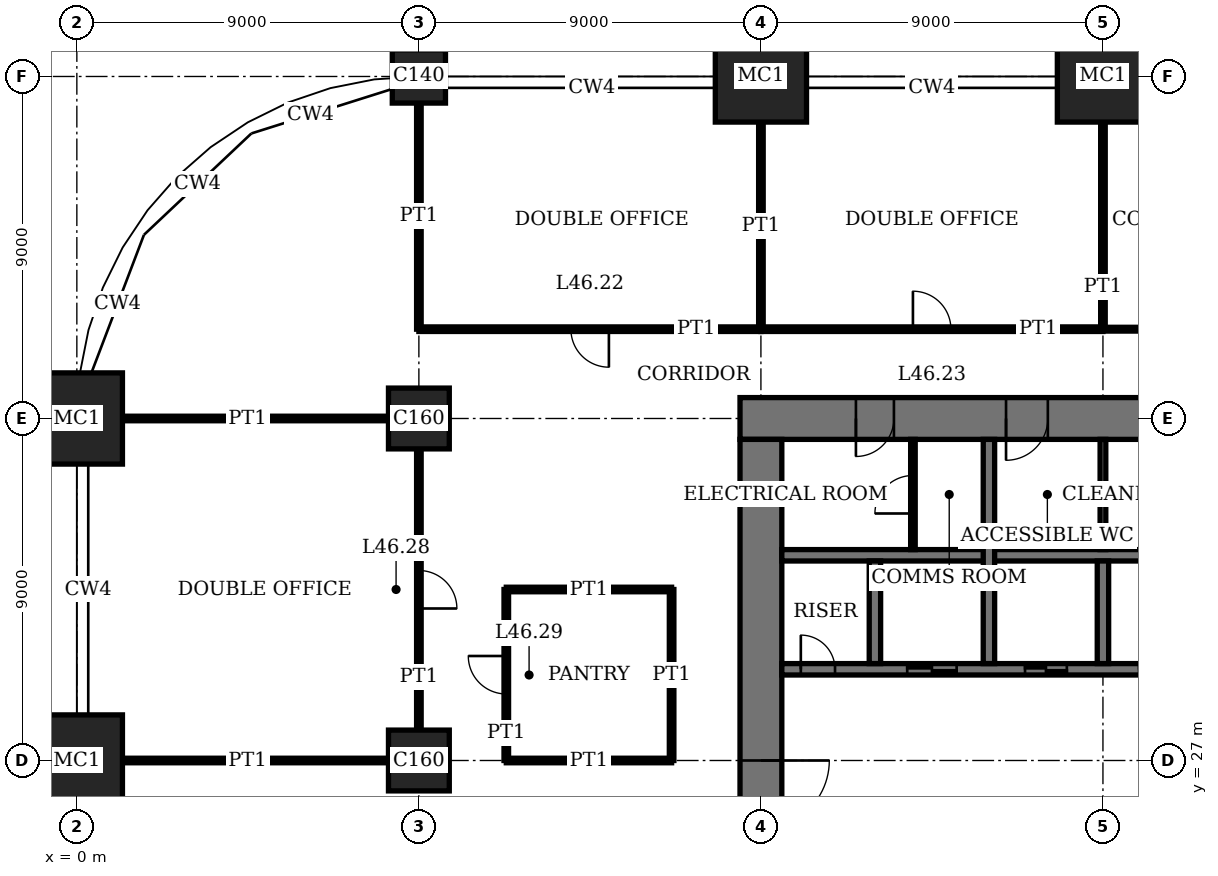
"""IFC4 building model, lengths in metres.
Left out: names, types, materials, properties, quantities, classifications, styles, units other than length and angle.
Written with IfcOpenShell. Run it as: python <this file> out.ifc"""

import sys

from ifc_helpers import new_model, si_unit, direction, frame, frame_2d, origin, origin_2d, place, context, subcontext, project, spatial, rectangle, extrude, element, fill, save


model = new_model("IFC4")
c1 = context("Model", 3, precision=1e-05, world=origin(), true_north=direction((0.0, 1.0)))
c2 = subcontext(c1, "Body", "Model", "MODEL_VIEW")
j1 = project(units=[si_unit("LENGTHUNIT", "METRE"), si_unit("PLANEANGLEUNIT", "RADIAN")], contexts=[c1])
p1 = place(None, origin())
s1 = spatial("IfcSite", under=j1, at=p1, CompositionType="ELEMENT")
p2 = place(p1, origin())
s2 = spatial("IfcBuilding", under=s1, at=p2, CompositionType="ELEMENT")
p3 = place(p2, frame((0.0, 0.0, 190.2)))
s3 = spatial("IfcBuildingStorey", under=s2, at=p3, CompositionType="ELEMENT", Elevation=190.2)
for number, where, z_axis, x_axis in (
    (1, (0.0, 27.0, 0.0), (0.0, 0.0, 1.0), (1.0, 0.0, 0.0)),
    (2, (0.0, 36.0, 0.0), (0.0, 0.0, 1.0), (1.0, 0.0, 0.0)),
):
    element("IfcColumn", number, at=place(p3, frame(where, z_axis=z_axis, x_axis=x_axis)), inside=s3, PredefinedType="COLUMN", context=c2, shape_type="SweptSolid", body=[
        extrude(rectangle(XDim=2.4, YDim=2.4, at=origin_2d()), origin(), (0.0, 0.0, 1.0), 4.0),
    ])
for number, where, z_axis, x_axis in (
    (3, (9.0, 27.0, 0.0), (0.0, 0.0, 1.0), (1.0, 0.0, 0.0)),
    (4, (9.0, 36.0, 0.0), (0.0, 0.0, 1.0), (1.0, 0.0, 0.0)),
):
    element("IfcColumn", number, at=place(p3, frame(where, z_axis=z_axis, x_axis=x_axis)), inside=s3, PredefinedType="COLUMN", context=c2, shape_type="SweptSolid", body=[
        extrude(rectangle(XDim=1.6, YDim=1.6, at=origin_2d()), origin(), (0.0, 0.0, 1.0), 4.0),
    ])
p4 = place(p3, frame((9.0, 45.0, 0.0), z_axis=(0.0, 0.0, 1.0), x_axis=(1.0, 0.0, 0.0)))
e5 = element("IfcColumn", 5, at=p4, inside=s3, PredefinedType="COLUMN", context=c2, shape_type="SweptSolid", body=[
    extrude(rectangle(XDim=1.4, YDim=1.4, at=origin_2d()), origin(), (0.0, 0.0, 1.0), 4.0),
])
for number, where, z_axis, x_axis in (
    (6, (18.0, 45.0, 0.0), (0.0, 0.0, 1.0), (1.0, 0.0, 0.0)),
    (7, (27.0, 45.0, 0.0), (0.0, 0.0, 1.0), (1.0, 0.0, 0.0)),
):
    element("IfcColumn", number, at=place(p3, frame(where, z_axis=z_axis, x_axis=x_axis)), inside=s3, PredefinedType="COLUMN", context=c2, shape_type="SweptSolid", body=[
        extrude(rectangle(XDim=2.4, YDim=2.4, at=origin_2d()), origin(), (0.0, 0.0, 1.0), 4.0),
    ])
p5 = place(p3, frame((45.55, 36.0, 0.0), z_axis=(0.0, 0.0, 1.0), x_axis=(-1.0, 0.0, 0.0)))
e8 = element("IfcWall", 8, at=p5, inside=s3, PredefinedType="SHEAR", context=c2, shape_type="SweptSolid", body=[
    extrude(rectangle(XDim=28.1, YDim=1.1, at=frame_2d((14.05, 0.0))), origin(), (0.0, 0.0, 1.0), 4.0),
])
p6 = place(p5, frame((11.55, 0.0, 0.0)))
e9 = element("IfcOpeningElement", 9, at=p6, cuts=e8, PredefinedType="OPENING", context=c2, shape_type="SweptSolid", body=[
    extrude(rectangle(XDim=1.0, YDim=2.4, at=frame_2d((0.5, 1.2))), frame((0.0, 0.56, 0.0), z_axis=(0.0, -1.0, 0.0), x_axis=(1.0, 0.0, 0.0)), (0.0, 0.0, 1.0), 1.12),
])
p7 = place(p5, frame((16.55, 0.0, 0.0)))
e10 = element("IfcOpeningElement", 10, at=p7, cuts=e8, PredefinedType="OPENING", context=c2, shape_type="SweptSolid", body=[
    extrude(rectangle(XDim=1.0, YDim=2.4, at=frame_2d((0.5, 1.2))), frame((0.0, 0.56, 0.0), z_axis=(0.0, -1.0, 0.0), x_axis=(1.0, 0.0, 0.0)), (0.0, 0.0, 1.0), 1.12),
])
p8 = place(p5, frame((20.0, 0.0, 0.0)))
e11 = element("IfcOpeningElement", 11, at=p8, cuts=e8, PredefinedType="OPENING", context=c2, shape_type="SweptSolid", body=[
    extrude(rectangle(XDim=1.1, YDim=2.4, at=frame_2d((0.55, 1.2))), frame((0.0, 0.56, 0.0), z_axis=(0.0, -1.0, 0.0), x_axis=(1.0, 0.0, 0.0)), (0.0, 0.0, 1.0), 1.12),
])
p9 = place(p5, frame((24.05, 0.0, 0.0)))
e12 = element("IfcOpeningElement", 12, at=p9, cuts=e8, PredefinedType="OPENING", context=c2, shape_type="SweptSolid", body=[
    extrude(rectangle(XDim=1.0, YDim=2.4, at=frame_2d((0.5, 1.2))), frame((0.0, 0.56, 0.0), z_axis=(0.0, -1.0, 0.0), x_axis=(1.0, 0.0, 0.0)), (0.0, 0.0, 1.0), 1.12),
])
p10 = place(p3, frame((18.0, 35.45, 0.0), z_axis=(0.0, 0.0, 1.0), x_axis=(0.0, -1.0, 0.0)))
e13 = element("IfcWall", 13, at=p10, inside=s3, PredefinedType="SHEAR", context=c2, shape_type="SweptSolid", body=[
    extrude(rectangle(XDim=16.9, YDim=1.1, at=frame_2d((8.45, 0.0))), origin(), (0.0, 0.0, 1.0), 4.0),
])
p11 = place(p10, frame((8.45, 0.0, 0.0)))
e14 = element("IfcOpeningElement", 14, at=p11, cuts=e13, PredefinedType="OPENING", context=c2, shape_type="SweptSolid", body=[
    extrude(rectangle(XDim=1.8, YDim=2.4, at=frame_2d((0.9, 1.2))), frame((0.0, 0.56, 0.0), z_axis=(0.0, -1.0, 0.0), x_axis=(1.0, 0.0, 0.0)), (0.0, 0.0, 1.0), 1.12),
])
p12 = place(p3, frame((18.55, 29.4, 0.0), z_axis=(0.0, 0.0, 1.0), x_axis=(1.0, 0.0, 0.0)))
e15 = element("IfcWall", 15, at=p12, inside=s3, PredefinedType="SHEAR", context=c2, shape_type="SweptSolid", body=[
    extrude(rectangle(XDim=25.9, YDim=0.3, at=frame_2d((12.95, 0.0))), origin(), (0.0, 0.0, 1.0), 4.0),
])
p13 = place(p12, frame((19.95, 0.0, 0.0)))
e16 = element("IfcOpeningElement", 16, at=p13, cuts=e15, PredefinedType="OPENING", context=c2, shape_type="SweptSolid", body=[
    extrude(rectangle(XDim=1.0, YDim=2.4, at=frame_2d((0.5, 1.2))), frame((0.0, 0.16, 0.0), z_axis=(0.0, -1.0, 0.0), x_axis=(1.0, 0.0, 0.0)), (0.0, 0.0, 1.0), 0.32),
])
p14 = place(p12, frame((0.5, 0.0, 0.0)))
e17 = element("IfcOpeningElement", 17, at=p14, cuts=e15, PredefinedType="OPENING", context=c2, shape_type="SweptSolid", body=[
    extrude(rectangle(XDim=0.9, YDim=2.1, at=frame_2d((0.45, 1.05))), frame((0.0, 0.16, 0.0), z_axis=(0.0, -1.0, 0.0), x_axis=(1.0, 0.0, 0.0)), (0.0, 0.0, 1.0), 0.32),
])
p15 = place(p12, frame((15.45, 0.0, 0.0)))
e18 = element("IfcOpeningElement", 18, at=p15, cuts=e15, PredefinedType="OPENING", context=c2, shape_type="SweptSolid", body=[
    extrude(rectangle(XDim=1.0, YDim=2.4, at=frame_2d((0.5, 1.2))), frame((0.0, 0.16, 0.0), z_axis=(0.0, -1.0, 0.0), x_axis=(1.0, 0.0, 0.0)), (0.0, 0.0, 1.0), 0.32),
])
p16 = place(p12, frame((12.45, 0.0, 0.0)))
e19 = element("IfcOpeningElement", 19, at=p16, cuts=e15, PredefinedType="OPENING", context=c2, shape_type="SweptSolid", body=[
    extrude(rectangle(XDim=1.0, YDim=2.4, at=frame_2d((0.5, 1.2))), frame((0.0, 0.16, 0.0), z_axis=(0.0, -1.0, 0.0), x_axis=(1.0, 0.0, 0.0)), (0.0, 0.0, 1.0), 0.32),
])
p17 = place(p12, frame((9.4, 0.0, 0.0)))
e20 = element("IfcOpeningElement", 20, at=p17, cuts=e15, PredefinedType="OPENING", context=c2, shape_type="SweptSolid", body=[
    extrude(rectangle(XDim=1.1, YDim=2.4, at=frame_2d((0.55, 1.2))), frame((0.0, 0.16, 0.0), z_axis=(0.0, -1.0, 0.0), x_axis=(1.0, 0.0, 0.0)), (0.0, 0.0, 1.0), 0.32),
])
p18 = place(p12, frame((6.4, 0.0, 0.0)))
e21 = element("IfcOpeningElement", 21, at=p18, cuts=e15, PredefinedType="OPENING", context=c2, shape_type="SweptSolid", body=[
    extrude(rectangle(XDim=1.1, YDim=2.4, at=frame_2d((0.55, 1.2))), frame((0.0, 0.16, 0.0), z_axis=(0.0, -1.0, 0.0), x_axis=(1.0, 0.0, 0.0)), (0.0, 0.0, 1.0), 0.32),
])
p19 = place(p12, frame((3.3, 0.0, 0.0)))
e22 = element("IfcOpeningElement", 22, at=p19, cuts=e15, PredefinedType="OPENING", context=c2, shape_type="SweptSolid", body=[
    extrude(rectangle(XDim=1.3, YDim=2.4, at=frame_2d((0.65, 1.2))), frame((0.0, 0.16, 0.0), z_axis=(0.0, -1.0, 0.0), x_axis=(1.0, 0.0, 0.0)), (0.0, 0.0, 1.0), 0.32),
])
p20 = place(p3, frame((18.55, 32.4, 0.0), z_axis=(0.0, 0.0, 1.0), x_axis=(1.0, 0.0, 0.0)))
e23 = element("IfcWall", 23, at=p20, inside=s3, PredefinedType="SHEAR", context=c2, shape_type="SweptSolid", body=[
    extrude(rectangle(XDim=17.3, YDim=0.3, at=frame_2d((8.65, 0.0))), origin(), (0.0, 0.0, 1.0), 4.0),
])
p21 = place(p3, frame((27.0, 29.55, 0.0), z_axis=(0.0, 0.0, 1.0), x_axis=(0.0, 1.0, 0.0)))
e24 = element("IfcWall", 24, at=p21, inside=s3, PredefinedType="SHEAR", context=c2, shape_type="SweptSolid", body=[
    extrude(rectangle(XDim=2.7, YDim=0.3, at=frame_2d((1.35, 0.0))), origin(), (0.0, 0.0, 1.0), 4.0),
])
p22 = place(p3, frame((24.0, 29.55, 0.0), z_axis=(0.0, 0.0, 1.0), x_axis=(0.0, 1.0, 0.0)))
e25 = element("IfcWall", 25, at=p22, inside=s3, PredefinedType="SHEAR", context=c2, shape_type="SweptSolid", body=[
    extrude(rectangle(XDim=5.9, YDim=0.3, at=frame_2d((2.95, 0.0))), origin(), (0.0, 0.0, 1.0), 4.0),
])
p23 = place(p3, frame((21.0, 29.55, 0.0), z_axis=(0.0, 0.0, 1.0), x_axis=(0.0, 1.0, 0.0)))
e26 = element("IfcWall", 26, at=p23, inside=s3, PredefinedType="SHEAR", context=c2, shape_type="SweptSolid", body=[
    extrude(rectangle(XDim=2.7, YDim=0.3, at=frame_2d((1.35, 0.0))), origin(), (0.0, 0.0, 1.0), 4.0),
])
p24 = place(p3, frame((1.2, 27.0, 0.0), z_axis=(0.0, 0.0, 1.0), x_axis=(1.0, 0.0, 0.0)))
e27 = element("IfcWall", 27, at=p24, inside=s3, PredefinedType="PARTITIONING", context=c2, shape_type="SweptSolid", body=[
    extrude(rectangle(XDim=7.0, YDim=0.12, at=frame_2d((3.5, 0.0))), origin(), (0.0, 0.0, 1.0), 3.05),
])
p25 = place(p3, frame((11.3, 27.0, 0.0), z_axis=(0.0, 0.0, 1.0), x_axis=(1.0, 0.0, 0.0)))
e28 = element("IfcWall", 28, at=p25, inside=s3, PredefinedType="PARTITIONING", context=c2, shape_type="SweptSolid", body=[
    extrude(rectangle(XDim=4.35, YDim=0.12, at=frame_2d((2.175, 0.0))), origin(), (0.0, 0.0, 1.0), 3.05),
])
p26 = place(p3, frame((11.3, 31.5, 0.0), z_axis=(0.0, 0.0, 1.0), x_axis=(1.0, 0.0, 0.0)))
e29 = element("IfcWall", 29, at=p26, inside=s3, PredefinedType="PARTITIONING", context=c2, shape_type="SweptSolid", body=[
    extrude(rectangle(XDim=4.35, YDim=0.12, at=frame_2d((2.175, 0.0))), origin(), (0.0, 0.0, 1.0), 3.1),
])
p27 = place(p3, frame((1.2, 36.0, 0.0), z_axis=(0.0, 0.0, 1.0), x_axis=(1.0, 0.0, 0.0)))
e30 = element("IfcWall", 30, at=p27, inside=s3, PredefinedType="PARTITIONING", context=c2, shape_type="SweptSolid", body=[
    extrude(rectangle(XDim=7.0, YDim=0.12, at=frame_2d((3.5, 0.0))), origin(), (0.0, 0.0, 1.0), 3.05),
])
p28 = place(p3, frame((9.0, 38.35, 0.0), z_axis=(0.0, 0.0, 1.0), x_axis=(1.0, 0.0, 0.0)))
e31 = element("IfcWall", 31, at=p28, inside=s3, PredefinedType="PARTITIONING", context=c2, shape_type="SweptSolid", body=[
    extrude(rectangle(XDim=9.0, YDim=0.12, at=frame_2d((4.5, 0.0))), origin(), (0.0, 0.0, 1.0), 3.75),
])
p29 = place(p28, frame((4.0, 0.0, 0.0)))
e32 = element("IfcOpeningElement", 32, at=p29, cuts=e31, PredefinedType="OPENING", context=c2, shape_type="SweptSolid", body=[
    extrude(rectangle(XDim=1.0, YDim=2.4, at=frame_2d((0.5, 1.2))), frame((0.0, 0.07, 0.0), z_axis=(0.0, -1.0, 0.0), x_axis=(1.0, 0.0, 0.0)), (0.0, 0.0, 1.0), 0.14),
])
p30 = place(p3, frame((18.0, 38.35, 0.0), z_axis=(0.0, 0.0, 1.0), x_axis=(1.0, 0.0, 0.0)))
e33 = element("IfcWall", 33, at=p30, inside=s3, PredefinedType="PARTITIONING", context=c2, shape_type="SweptSolid", body=[
    extrude(rectangle(XDim=9.0, YDim=0.12, at=frame_2d((4.5, 0.0))), origin(), (0.0, 0.0, 1.0), 3.75),
])
p31 = place(p30, frame((4.0, 0.0, 0.0)))
e34 = element("IfcOpeningElement", 34, at=p31, cuts=e33, PredefinedType="OPENING", context=c2, shape_type="SweptSolid", body=[
    extrude(rectangle(XDim=1.0, YDim=2.4, at=frame_2d((0.5, 1.2))), frame((0.0, 0.07, 0.0), z_axis=(0.0, -1.0, 0.0), x_axis=(1.0, 0.0, 0.0)), (0.0, 0.0, 1.0), 0.14),
])
p32 = place(p3, frame((27.0, 38.35, 0.0), z_axis=(0.0, 0.0, 1.0), x_axis=(1.0, 0.0, 0.0)))
e35 = element("IfcWall", 35, at=p32, inside=s3, PredefinedType="PARTITIONING", context=c2, shape_type="SweptSolid", body=[
    extrude(rectangle(XDim=9.0, YDim=0.1, at=frame_2d((4.5, 0.0))), origin(), (0.0, 0.0, 1.0), 3.75),
])
p33 = place(p32, frame((4.0, 0.0, 0.0)))
e36 = element("IfcOpeningElement", 36, at=p33, cuts=e35, PredefinedType="OPENING", context=c2, shape_type="SweptSolid", body=[
    extrude(rectangle(XDim=1.0, YDim=2.4, at=frame_2d((0.5, 1.2))), frame((0.0, 0.06, 0.0), z_axis=(0.0, -1.0, 0.0), x_axis=(1.0, 0.0, 0.0)), (0.0, 0.0, 1.0), 0.12),
])
p34 = place(p3, frame((9.0, 38.35, 0.0), z_axis=(0.0, 0.0, 1.0), x_axis=(0.0, 1.0, 0.0)))
e37 = element("IfcWall", 37, at=p34, inside=s3, PredefinedType="PARTITIONING", context=c2, shape_type="SweptSolid", body=[
    extrude(rectangle(XDim=5.95, YDim=0.12, at=frame_2d((2.975, 0.0))), origin(), (0.0, 0.0, 1.0), 3.05),
])
p35 = place(p3, frame((9.0, 27.8, 0.0), z_axis=(0.0, 0.0, 1.0), x_axis=(0.0, 1.0, 0.0)))
e38 = element("IfcWall", 38, at=p35, inside=s3, PredefinedType="PARTITIONING", context=c2, shape_type="SweptSolid", body=[
    extrude(rectangle(XDim=7.4, YDim=0.12, at=frame_2d((3.7, 0.0))), origin(), (0.0, 0.0, 1.0), 3.05),
])
p36 = place(p35, frame((3.2, 0.0, 0.0)))
e39 = element("IfcOpeningElement", 39, at=p36, cuts=e38, PredefinedType="OPENING", context=c2, shape_type="SweptSolid", body=[
    extrude(rectangle(XDim=1.0, YDim=2.4, at=frame_2d((0.5, 1.2))), frame((0.0, 0.07, 0.0), z_axis=(0.0, -1.0, 0.0), x_axis=(1.0, 0.0, 0.0)), (0.0, 0.0, 1.0), 0.14),
])
p37 = place(p3, frame((11.3, 27.0, 0.0), z_axis=(0.0, 0.0, 1.0), x_axis=(0.0, 1.0, 0.0)))
e40 = element("IfcWall", 40, at=p37, inside=s3, PredefinedType="PARTITIONING", context=c2, shape_type="SweptSolid", body=[
    extrude(rectangle(XDim=4.5, YDim=0.12, at=frame_2d((2.25, 0.0))), origin(), (0.0, 0.0, 1.0), 3.75),
])
p38 = place(p37, frame((1.75, 0.0, 0.0)))
e41 = element("IfcOpeningElement", 41, at=p38, cuts=e40, PredefinedType="OPENING", context=c2, shape_type="SweptSolid", body=[
    extrude(rectangle(XDim=1.0, YDim=2.4, at=frame_2d((0.5, 1.2))), frame((0.0, 0.07, 0.0), z_axis=(0.0, -1.0, 0.0), x_axis=(1.0, 0.0, 0.0)), (0.0, 0.0, 1.0), 0.14),
])
p39 = place(p3, frame((15.65, 27.0, 0.0), z_axis=(0.0, 0.0, 1.0), x_axis=(0.0, 1.0, 0.0)))
e42 = element("IfcWall", 42, at=p39, inside=s3, PredefinedType="PARTITIONING", context=c2, shape_type="SweptSolid", body=[
    extrude(rectangle(XDim=4.5, YDim=0.12, at=frame_2d((2.25, 0.0))), origin(), (0.0, 0.0, 1.0), 3.75),
])
for number, where, z_axis, x_axis in (
    (43, (18.0, 38.35, 0.0), (0.0, 0.0, 1.0), (0.0, 1.0, 0.0)),
    (44, (27.0, 38.35, 0.0), (0.0, 0.0, 1.0), (0.0, 1.0, 0.0)),
):
    element("IfcWall", number, at=place(p3, frame(where, z_axis=z_axis, x_axis=x_axis)), inside=s3, PredefinedType="PARTITIONING", context=c2, shape_type="SweptSolid", body=[
        extrude(rectangle(XDim=5.45, YDim=0.12, at=frame_2d((2.725, 0.0))), origin(), (0.0, 0.0, 1.0), 3.05),
    ])
p40 = place(p3, frame((27.0, 32.55, 0.0), z_axis=(0.0, 0.0, 1.0), x_axis=(0.0, 1.0, 0.0)))
e45 = element("IfcWall", 45, at=p40, inside=s3, PredefinedType="PARTITIONING", context=c2, shape_type="SweptSolid", body=[
    extrude(rectangle(XDim=2.9, YDim=0.15, at=frame_2d((1.45, 0.0))), origin(), (0.0, 0.0, 1.0), 3.75),
])
p41 = place(p3, frame((22.0, 32.55, 0.0), z_axis=(0.0, 0.0, 1.0), x_axis=(0.0, 1.0, 0.0)))
e46 = element("IfcWall", 46, at=p41, inside=s3, PredefinedType="PARTITIONING", context=c2, shape_type="SweptSolid", body=[
    extrude(rectangle(XDim=2.9, YDim=0.12, at=frame_2d((1.45, 0.0))), origin(), (0.0, 0.0, 1.0), 3.75),
])
p42 = place(p41, frame((0.95, 0.0, 0.0)))
e47 = element("IfcOpeningElement", 47, at=p42, cuts=e46, PredefinedType="OPENING", context=c2, shape_type="SweptSolid", body=[
    extrude(rectangle(XDim=1.0, YDim=2.4, at=frame_2d((0.5, 1.2))), frame((0.0, 0.07, 0.0), z_axis=(0.0, -1.0, 0.0), x_axis=(1.0, 0.0, 0.0)), (0.0, 0.0, 1.0), 0.14),
])
p43 = place(p11, origin())
e48 = element("IfcDoor", 48, at=p43, inside=s3, OperationType="DOUBLE_DOOR_DOUBLE_SWING", PredefinedType="DOOR", context=c2, shape_type="SweptSolid", body=[
    extrude(rectangle(XDim=1.8, YDim=2.4, at=frame_2d((0.9, 1.2))), frame((0.0, 0.03, 0.0), z_axis=(0.0, -1.0, 0.0), x_axis=(1.0, 0.0, 0.0)), (0.0, 0.0, 1.0), 0.06),
    extrude(rectangle(XDim=0.04, YDim=2.4, at=frame_2d((0.02, 1.2))), frame((0.0, 0.55, 0.0), z_axis=(0.0, -1.0, 0.0), x_axis=(1.0, 0.0, 0.0)), (0.0, 0.0, 1.0), 1.1),
    extrude(rectangle(XDim=0.04, YDim=2.4, at=frame_2d((1.78, 1.2))), frame((0.0, 0.55, 0.0), z_axis=(0.0, -1.0, 0.0), x_axis=(1.0, 0.0, 0.0)), (0.0, 0.0, 1.0), 1.1),
    extrude(rectangle(XDim=1.8, YDim=0.04, at=frame_2d((0.9, 2.38))), frame((0.0, 0.55, 0.0), z_axis=(0.0, -1.0, 0.0), x_axis=(1.0, 0.0, 0.0)), (0.0, 0.0, 1.0), 1.1),
])
fill(e14, e48)
p44 = place(p8, origin())
e49 = element("IfcDoor", 49, at=p44, inside=s3, OperationType="SINGLE_SWING_LEFT", PredefinedType="DOOR", context=c2, shape_type="SweptSolid", body=[
    extrude(rectangle(XDim=1.1, YDim=2.4, at=frame_2d((0.55, 1.2))), frame((0.0, 0.025, 0.0), z_axis=(0.0, -1.0, 0.0), x_axis=(1.0, 0.0, 0.0)), (0.0, 0.0, 1.0), 0.05),
    extrude(rectangle(XDim=0.04, YDim=2.4, at=frame_2d((0.02, 1.2))), frame((0.0, 0.44, 0.0), z_axis=(0.0, -1.0, 0.0), x_axis=(1.0, 0.0, 0.0)), (0.0, 0.0, 1.0), 0.88),
    extrude(rectangle(XDim=0.04, YDim=2.4, at=frame_2d((1.08, 1.2))), frame((0.0, 0.44, 0.0), z_axis=(0.0, -1.0, 0.0), x_axis=(1.0, 0.0, 0.0)), (0.0, 0.0, 1.0), 0.88),
    extrude(rectangle(XDim=1.1, YDim=0.04, at=frame_2d((0.55, 2.38))), frame((0.0, 0.44, 0.0), z_axis=(0.0, -1.0, 0.0), x_axis=(1.0, 0.0, 0.0)), (0.0, 0.0, 1.0), 0.88),
])
fill(e11, e49)
p45 = place(p9, origin())
e50 = element("IfcDoor", 50, at=p45, inside=s3, OperationType="SINGLE_SWING_LEFT", PredefinedType="DOOR", context=c2, shape_type="SweptSolid", body=[
    extrude(rectangle(XDim=1.0, YDim=2.4, at=frame_2d((0.5, 1.2))), frame((0.0, 0.025, 0.0), z_axis=(0.0, -1.0, 0.0), x_axis=(1.0, 0.0, 0.0)), (0.0, 0.0, 1.0), 0.05),
    extrude(rectangle(XDim=0.04, YDim=2.4, at=frame_2d((0.02, 1.2))), frame((0.0, 0.4, 0.0), z_axis=(0.0, -1.0, 0.0), x_axis=(1.0, 0.0, 0.0)), (0.0, 0.0, 1.0), 0.8),
    extrude(rectangle(XDim=0.04, YDim=2.4, at=frame_2d((0.98, 1.2))), frame((0.0, 0.4, 0.0), z_axis=(0.0, -1.0, 0.0), x_axis=(1.0, 0.0, 0.0)), (0.0, 0.0, 1.0), 0.8),
    extrude(rectangle(XDim=1.0, YDim=0.04, at=frame_2d((0.5, 2.38))), frame((0.0, 0.4, 0.0), z_axis=(0.0, -1.0, 0.0), x_axis=(1.0, 0.0, 0.0)), (0.0, 0.0, 1.0), 0.8),
])
fill(e12, e50)
p46 = place(p14, origin())
e51 = element("IfcDoor", 51, at=p46, inside=s3, OperationType="SINGLE_SWING_RIGHT", PredefinedType="DOOR", context=c2, shape_type="SweptSolid", body=[
    extrude(rectangle(XDim=0.9, YDim=2.1, at=frame_2d((0.45, 1.05))), frame((0.0, 0.03, 0.0), z_axis=(0.0, -1.0, 0.0), x_axis=(1.0, 0.0, 0.0)), (0.0, 0.0, 1.0), 0.06),
])
fill(e17, e51)
p47 = place(p29, origin())
e52 = element("IfcDoor", 52, at=p47, inside=s3, OperationType="SINGLE_SWING_RIGHT", PredefinedType="DOOR", context=c2, shape_type="SweptSolid", body=[
    extrude(rectangle(XDim=1.0, YDim=2.4, at=frame_2d((0.5, 1.2))), frame((0.0, 0.025, 0.0), z_axis=(0.0, -1.0, 0.0), x_axis=(1.0, 0.0, 0.0)), (0.0, 0.0, 1.0), 0.05),
])
fill(e32, e52)
p48 = place(p31, origin())
e53 = element("IfcDoor", 53, at=p48, inside=s3, OperationType="SINGLE_SWING_RIGHT", PredefinedType="DOOR", context=c2, shape_type="SweptSolid", body=[
    extrude(rectangle(XDim=1.0, YDim=2.4, at=frame_2d((0.5, 1.2))), frame((0.0, 0.025, 0.0), z_axis=(0.0, -1.0, 0.0), x_axis=(1.0, 0.0, 0.0)), (0.0, 0.0, 1.0), 0.05),
])
fill(e34, e53)
p49 = place(p36, origin())
e54 = element("IfcDoor", 54, at=p49, inside=s3, OperationType="SINGLE_SWING_LEFT", PredefinedType="DOOR", context=c2, shape_type="SweptSolid", body=[
    extrude(rectangle(XDim=1.0, YDim=2.4, at=frame_2d((0.5, 1.2))), frame((0.0, 0.025, 0.0), z_axis=(0.0, -1.0, 0.0), x_axis=(1.0, 0.0, 0.0)), (0.0, 0.0, 1.0), 0.05),
])
fill(e39, e54)
p50 = place(p38, origin())
e55 = element("IfcDoor", 55, at=p50, inside=s3, OperationType="SINGLE_SWING_LEFT", PredefinedType="DOOR", context=c2, shape_type="SweptSolid", body=[
    extrude(rectangle(XDim=1.0, YDim=2.4, at=frame_2d((0.5, 1.2))), frame((0.0, 0.025, 0.0), z_axis=(0.0, -1.0, 0.0), x_axis=(1.0, 0.0, 0.0)), (0.0, 0.0, 1.0), 0.05),
])
fill(e41, e55)
p51 = place(p42, origin())
e56 = element("IfcDoor", 56, at=p51, inside=s3, OperationType="SINGLE_SWING_RIGHT", PredefinedType="DOOR", context=c2, shape_type="SweptSolid", body=[
    extrude(rectangle(XDim=1.0, YDim=2.4, at=frame_2d((0.5, 1.2))), frame((0.0, 0.03, 0.0), z_axis=(0.0, -1.0, 0.0), x_axis=(1.0, 0.0, 0.0)), (0.0, 0.0, 1.0), 0.06),
])
fill(e47, e56)
p52 = place(p18, origin())
e57 = element("IfcDoor", 57, at=p52, inside=s3, OperationType="DOUBLE_DOOR_SLIDING", PredefinedType="DOOR", context=c2, shape_type="SweptSolid", body=[
    extrude(rectangle(XDim=1.1, YDim=2.4, at=frame_2d((0.55, 1.2))), frame((0.0, 0.02, 0.0), z_axis=(0.0, -1.0, 0.0), x_axis=(1.0, 0.0, 0.0)), (0.0, 0.0, 1.0), 0.04),
])
fill(e21, e57)
p53 = place(p19, origin())
e58 = element("IfcDoor", 58, at=p53, inside=s3, OperationType="DOUBLE_DOOR_SLIDING", PredefinedType="DOOR", context=c2, shape_type="SweptSolid", body=[
    extrude(rectangle(XDim=1.3, YDim=2.4, at=frame_2d((0.65, 1.2))), frame((0.0, 0.02, 0.0), z_axis=(0.0, -1.0, 0.0), x_axis=(1.0, 0.0, 0.0)), (0.0, 0.0, 1.0), 0.04),
])
fill(e22, e58)
save(model, sys.argv[1])
